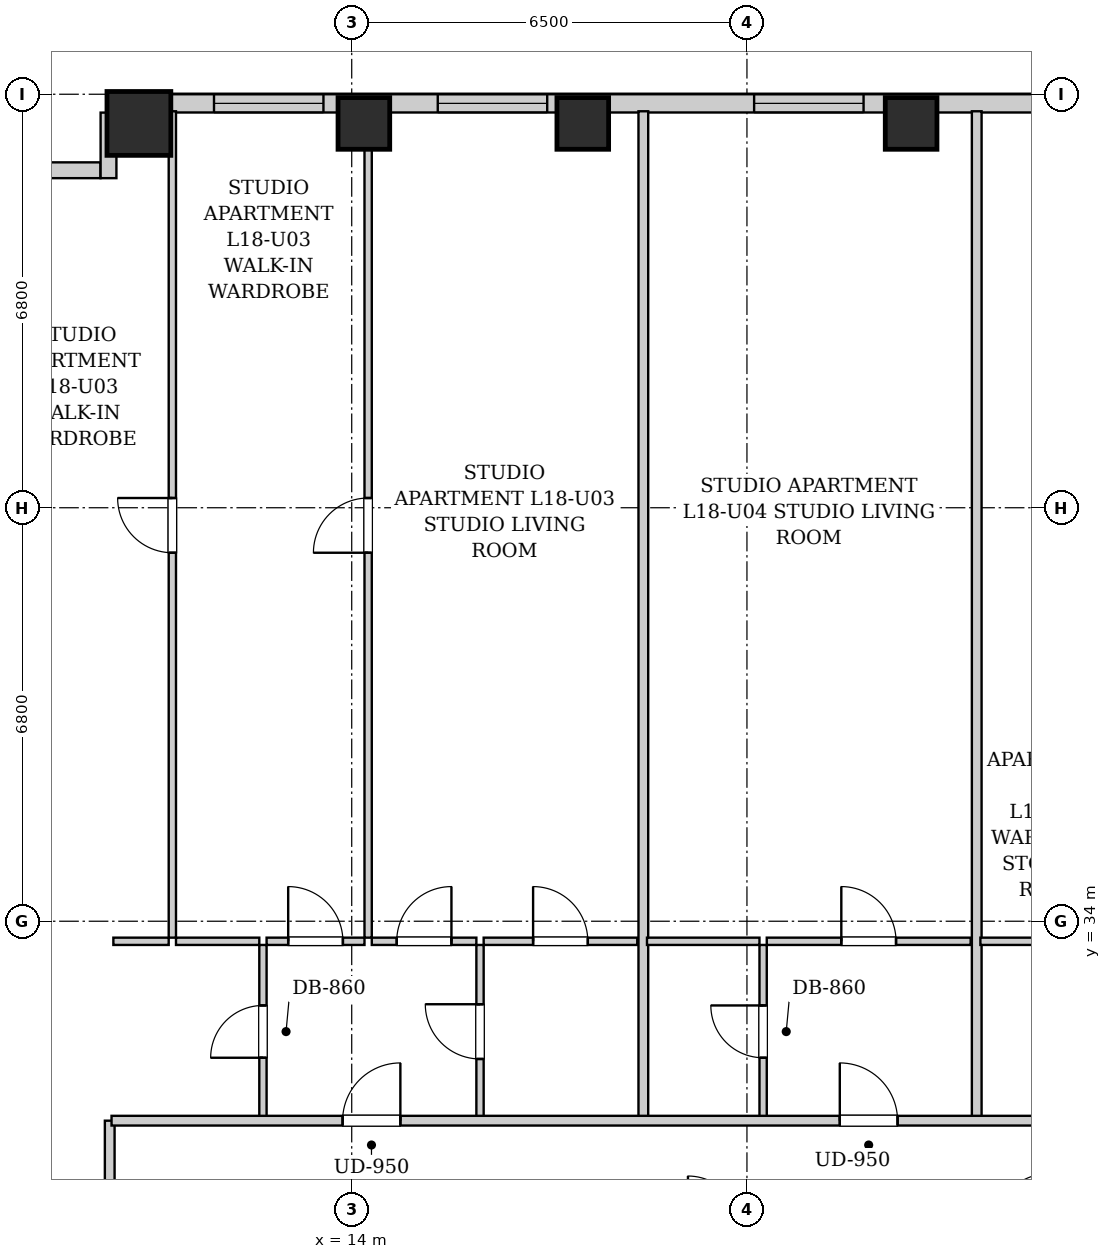
"""IFC4 building model, lengths in metres.
Left out: names, types, materials, properties, quantities, classifications, styles, units other than length and angle.
Written with IfcOpenShell. Run it as: python <this file> out.ifc"""

import sys

from ifc_helpers import new_model, si_unit, direction, frame, frame_2d, origin, origin_2d, place, context, subcontext, project, spatial, rectangle, extrude, element, fill, save


model = new_model("IFC4")
c1 = context("Model", 3, precision=1e-05, world=origin(), true_north=direction((0.0, 1.0)))
c2 = subcontext(c1, "Body", "Model", "MODEL_VIEW")
j1 = project(units=[si_unit("LENGTHUNIT", "METRE"), si_unit("PLANEANGLEUNIT", "RADIAN")], contexts=[c1])
p1 = place(None, origin())
s1 = spatial("IfcSite", under=j1, at=p1, CompositionType="ELEMENT")
p2 = place(p1, origin())
s2 = spatial("IfcBuilding", under=s1, at=p2, CompositionType="ELEMENT")
p3 = place(p2, frame((0.0, 0.0, 67.4)))
s3 = spatial("IfcBuildingStorey", under=s2, at=p3, CompositionType="ELEMENT", Elevation=67.4)
p4 = place(p3, frame((10.5, 47.12, 0.0), z_axis=(0.0, 0.0, 1.0), x_axis=(1.0, 0.0, 0.0)))
e1 = element("IfcColumn", 1, at=p4, inside=s3, PredefinedType="COLUMN", context=c2, shape_type="SweptSolid", body=[
    extrude(rectangle(XDim=1.05, YDim=1.05, at=origin_2d()), origin(), (0.0, 0.0, 1.0), 3.2),
])
for number, where, z_axis, x_axis in (
    (2, (14.2, 47.12, 0.0), (0.0, 0.0, 1.0), (1.0, 0.0, 0.0)),
    (3, (17.8, 47.12, 0.0), (0.0, 0.0, 1.0), (1.0, 0.0, 0.0)),
    (4, (23.2, 47.12, 0.0), (0.0, 0.0, 1.0), (1.0, 0.0, 0.0)),
):
    element("IfcColumn", number, at=place(p3, frame(where, z_axis=z_axis, x_axis=x_axis)), inside=s3, PredefinedType="COLUMN", context=c2, shape_type="SweptSolid", body=[
        extrude(rectangle(XDim=0.85, YDim=0.85, at=origin_2d()), origin(), (0.0, 0.0, 1.0), 3.2),
    ])
p5 = place(p3, frame((10.0, 47.45, 0.0), z_axis=(0.0, 0.0, 1.0), x_axis=(1.0, 0.0, 0.0)))
e5 = element("IfcWall", 5, at=p5, inside=s3, PredefinedType="SOLIDWALL", context=c2, shape_type="SweptSolid", body=[
    extrude(rectangle(XDim=26.35, YDim=0.3, at=frame_2d((13.175, 0.0))), origin(), (0.0, 0.0, 1.0), 1.915),
])
p6 = place(p5, frame((1.735, 0.0, 0.55)))
e6 = element("IfcOpeningElement", 6, at=p6, cuts=e5, PredefinedType="OPENING", context=c2, shape_type="SweptSolid", body=[
    extrude(rectangle(XDim=1.8, YDim=1.2, at=frame_2d((0.9, 0.6))), frame((0.0, 0.16, 0.0), z_axis=(0.0, -1.0, 0.0), x_axis=(1.0, 0.0, 0.0)), (0.0, 0.0, 1.0), 0.32),
])
p7 = place(p5, frame((5.415, 0.0, 0.55)))
e7 = element("IfcOpeningElement", 7, at=p7, cuts=e5, PredefinedType="OPENING", context=c2, shape_type="SweptSolid", body=[
    extrude(rectangle(XDim=1.8, YDim=1.2, at=frame_2d((0.9, 0.6))), frame((0.0, 0.16, 0.0), z_axis=(0.0, -1.0, 0.0), x_axis=(1.0, 0.0, 0.0)), (0.0, 0.0, 1.0), 0.32),
])
p8 = place(p5, frame((10.618, 0.0, 0.55)))
e8 = element("IfcOpeningElement", 8, at=p8, cuts=e5, PredefinedType="OPENING", context=c2, shape_type="SweptSolid", body=[
    extrude(rectangle(XDim=1.8, YDim=1.2, at=frame_2d((0.9, 0.6))), frame((0.0, 0.16, 0.0), z_axis=(0.0, -1.0, 0.0), x_axis=(1.0, 0.0, 0.0)), (0.0, 0.0, 1.0), 0.32),
])
p9 = place(p5, frame((17.696, 0.0, 0.55)))
e9 = element("IfcOpeningElement", 9, at=p9, cuts=e5, PredefinedType="OPENING", context=c2, shape_type="SweptSolid", body=[
    extrude(rectangle(XDim=1.8, YDim=1.2, at=frame_2d((0.9, 0.6))), frame((0.0, 0.16, 0.0), z_axis=(0.0, -1.0, 0.0), x_axis=(1.0, 0.0, 0.0)), (0.0, 0.0, 1.0), 0.32),
])
p10 = place(p5, frame((20.815, 0.0, 0.55)))
e10 = element("IfcOpeningElement", 10, at=p10, cuts=e5, PredefinedType="OPENING", context=c2, shape_type="SweptSolid", body=[
    extrude(rectangle(XDim=1.8, YDim=1.2, at=frame_2d((0.9, 0.6))), frame((0.0, 0.16, 0.0), z_axis=(0.0, -1.0, 0.0), x_axis=(1.0, 0.0, 0.0)), (0.0, 0.0, 1.0), 0.32),
])
p11 = place(p5, frame((23.785, 0.0, 0.55)))
e11 = element("IfcOpeningElement", 11, at=p11, cuts=e5, PredefinedType="OPENING", context=c2, shape_type="SweptSolid", body=[
    extrude(rectangle(XDim=1.35, YDim=1.2, at=frame_2d((0.675, 0.6))), frame((0.0, 0.16, 0.0), z_axis=(0.0, -1.0, 0.0), x_axis=(1.0, 0.0, 0.0)), (0.0, 0.0, 1.0), 0.32),
])
p12 = place(p3, frame((8.882, 46.35, 0.0), z_axis=(0.0, 0.0, 1.0), x_axis=(1.0, 0.0, 0.0)))
e12 = element("IfcWall", 12, at=p12, inside=s3, PredefinedType="SOLIDWALL", context=c2, shape_type="SweptSolid", body=[
    extrude(rectangle(XDim=0.986, YDim=0.26, at=frame_2d((0.493, 0.0))), origin(), (0.0, 0.0, 1.0), 2.88),
])
p13 = place(p3, frame((10.0, 46.22, 0.0), z_axis=(0.0, 0.0, 1.0), x_axis=(0.0, 1.0, 0.0)))
e13 = element("IfcWall", 13, at=p13, inside=s3, PredefinedType="SOLIDWALL", context=c2, shape_type="SweptSolid", body=[
    extrude(rectangle(XDim=1.078, YDim=0.26, at=frame_2d((0.539, 0.0))), origin(), (0.0, 0.0, 1.0), 2.88),
])
p14 = place(p3, frame((10.02, 28.98, 0.0), z_axis=(0.0, 0.0, 1.0), x_axis=(0.0, 1.0, 0.0)))
e14 = element("IfcWall", 14, at=p14, inside=s3, PredefinedType="PARTITIONING", context=c2, shape_type="SweptSolid", body=[
    extrude(rectangle(XDim=1.74, YDim=0.16, at=frame_2d((0.87, 0.0))), origin(), (0.0, 0.0, 1.0), 2.88),
])
p15 = place(p3, frame((12.54, 30.76, 0.0), z_axis=(0.0, 0.0, 1.0), x_axis=(0.0, 1.0, 0.0)))
e15 = element("IfcWall", 15, at=p15, inside=s3, PredefinedType="PARTITIONING", context=c2, shape_type="SweptSolid", body=[
    extrude(rectangle(XDim=2.85, YDim=0.12, at=frame_2d((1.425, 0.0))), origin(), (0.0, 0.0, 1.0), 2.88),
])
p16 = place(p15, frame((0.995, 0.0, 0.0)))
e16 = element("IfcOpeningElement", 16, at=p16, cuts=e15, PredefinedType="OPENING", context=c2, shape_type="SweptSolid", body=[
    extrude(rectangle(XDim=0.86, YDim=2.05, at=frame_2d((0.43, 1.025))), frame((0.0, 0.07, 0.0), z_axis=(0.0, -1.0, 0.0), x_axis=(1.0, 0.0, 0.0)), (0.0, 0.0, 1.0), 0.14),
])
p17 = place(p3, frame((10.08, 33.67, 0.0), z_axis=(0.0, 0.0, 1.0), x_axis=(1.0, 0.0, 0.0)))
e17 = element("IfcWall", 17, at=p17, inside=s3, PredefinedType="PARTITIONING", context=c2, shape_type="SweptSolid", body=[
    extrude(rectangle(XDim=0.91, YDim=0.12, at=frame_2d((0.455, 0.0))), origin(), (0.0, 0.0, 1.0), 2.88),
])
p18 = place(p3, frame((11.11, 33.67, 0.0), z_axis=(0.0, 0.0, 1.0), x_axis=(1.0, 0.0, 0.0)))
e18 = element("IfcWall", 18, at=p18, inside=s3, PredefinedType="PARTITIONING", context=c2, shape_type="SweptSolid", body=[
    extrude(rectangle(XDim=1.37, YDim=0.12, at=frame_2d((0.685, 0.0))), origin(), (0.0, 0.0, 1.0), 2.88),
])
p19 = place(p3, frame((16.11, 30.76, 0.0), z_axis=(0.0, 0.0, 1.0), x_axis=(0.0, 1.0, 0.0)))
e19 = element("IfcWall", 19, at=p19, inside=s3, PredefinedType="PARTITIONING", context=c2, shape_type="SweptSolid", body=[
    extrude(rectangle(XDim=2.85, YDim=0.12, at=frame_2d((1.425, 0.0))), origin(), (0.0, 0.0, 1.0), 2.88),
])
p20 = place(p19, frame((0.975, 0.0, 0.0)))
e20 = element("IfcOpeningElement", 20, at=p20, cuts=e19, PredefinedType="OPENING", context=c2, shape_type="SweptSolid", body=[
    extrude(rectangle(XDim=0.9, YDim=2.05, at=frame_2d((0.45, 1.025))), frame((0.0, 0.07, 0.0), z_axis=(0.0, -1.0, 0.0), x_axis=(1.0, 0.0, 0.0)), (0.0, 0.0, 1.0), 0.14),
])
p21 = place(p3, frame((12.6, 33.67, 0.0), z_axis=(0.0, 0.0, 1.0), x_axis=(1.0, 0.0, 0.0)))
e21 = element("IfcWall", 21, at=p21, inside=s3, PredefinedType="PARTITIONING", context=c2, shape_type="SweptSolid", body=[
    extrude(rectangle(XDim=1.61, YDim=0.12, at=frame_2d((0.805, 0.0))), origin(), (0.0, 0.0, 1.0), 2.88),
])
p22 = place(p21, frame((0.355, 0.0, 0.0)))
e22 = element("IfcOpeningElement", 22, at=p22, cuts=e21, PredefinedType="OPENING", context=c2, shape_type="SweptSolid", body=[
    extrude(rectangle(XDim=0.9, YDim=2.05, at=frame_2d((0.45, 1.025))), frame((0.0, 0.07, 0.0), z_axis=(0.0, -1.0, 0.0), x_axis=(1.0, 0.0, 0.0)), (0.0, 0.0, 1.0), 0.14),
])
p23 = place(p3, frame((14.33, 33.67, 0.0), z_axis=(0.0, 0.0, 1.0), x_axis=(1.0, 0.0, 0.0)))
e23 = element("IfcWall", 23, at=p23, inside=s3, PredefinedType="PARTITIONING", context=c2, shape_type="SweptSolid", body=[
    extrude(rectangle(XDim=1.72, YDim=0.12, at=frame_2d((0.86, 0.0))), origin(), (0.0, 0.0, 1.0), 2.88),
])
p24 = place(p23, frame((0.41, 0.0, 0.0)))
e24 = element("IfcOpeningElement", 24, at=p24, cuts=e23, PredefinedType="OPENING", context=c2, shape_type="SweptSolid", body=[
    extrude(rectangle(XDim=0.9, YDim=2.05, at=frame_2d((0.45, 1.025))), frame((0.0, 0.07, 0.0), z_axis=(0.0, -1.0, 0.0), x_axis=(1.0, 0.0, 0.0)), (0.0, 0.0, 1.0), 0.14),
])
p25 = place(p3, frame((16.17, 33.67, 0.0), z_axis=(0.0, 0.0, 1.0), x_axis=(1.0, 0.0, 0.0)))
e25 = element("IfcWall", 25, at=p25, inside=s3, PredefinedType="PARTITIONING", context=c2, shape_type="SweptSolid", body=[
    extrude(rectangle(XDim=2.526, YDim=0.12, at=frame_2d((1.263, 0.0))), origin(), (0.0, 0.0, 1.0), 2.88),
])
p26 = place(p25, frame((0.813, 0.0, 0.0)))
e26 = element("IfcOpeningElement", 26, at=p26, cuts=e25, PredefinedType="OPENING", context=c2, shape_type="SweptSolid", body=[
    extrude(rectangle(XDim=0.9, YDim=2.05, at=frame_2d((0.45, 1.025))), frame((0.0, 0.07, 0.0), z_axis=(0.0, -1.0, 0.0), x_axis=(1.0, 0.0, 0.0)), (0.0, 0.0, 1.0), 0.14),
])
p27 = place(p3, frame((11.05, 33.73, 0.0), z_axis=(0.0, 0.0, 1.0), x_axis=(0.0, 1.0, 0.0)))
e27 = element("IfcWall", 27, at=p27, inside=s3, PredefinedType="PARTITIONING", context=c2, shape_type="SweptSolid", body=[
    extrude(rectangle(XDim=13.59, YDim=0.12, at=frame_2d((6.795, 0.0))), origin(), (0.0, 0.0, 1.0), 2.88),
])
p28 = place(p27, frame((6.33, 0.0, 0.0)))
e28 = element("IfcOpeningElement", 28, at=p28, cuts=e27, PredefinedType="OPENING", context=c2, shape_type="SweptSolid", body=[
    extrude(rectangle(XDim=0.9, YDim=2.05, at=frame_2d((0.45, 1.025))), frame((0.0, 0.07, 0.0), z_axis=(0.0, -1.0, 0.0), x_axis=(1.0, 0.0, 0.0)), (0.0, 0.0, 1.0), 0.14),
])
p29 = place(p3, frame((14.27, 33.73, 0.0), z_axis=(0.0, 0.0, 1.0), x_axis=(0.0, 1.0, 0.0)))
e29 = element("IfcWall", 29, at=p29, inside=s3, PredefinedType="PARTITIONING", context=c2, shape_type="SweptSolid", body=[
    extrude(rectangle(XDim=13.59, YDim=0.12, at=frame_2d((6.795, 0.0))), origin(), (0.0, 0.0, 1.0), 2.88),
])
p30 = place(p29, frame((6.33, 0.0, 0.0)))
e30 = element("IfcOpeningElement", 30, at=p30, cuts=e29, PredefinedType="OPENING", context=c2, shape_type="SweptSolid", body=[
    extrude(rectangle(XDim=0.9, YDim=2.05, at=frame_2d((0.45, 1.025))), frame((0.0, 0.07, 0.0), z_axis=(0.0, -1.0, 0.0), x_axis=(1.0, 0.0, 0.0)), (0.0, 0.0, 1.0), 0.14),
])
p31 = place(p3, frame((18.796, 30.76, 0.0), z_axis=(0.0, 0.0, 1.0), x_axis=(0.0, 1.0, 0.0)))
e31 = element("IfcWall", 31, at=p31, inside=s3, PredefinedType="PARTITIONING", context=c2, shape_type="SweptSolid", body=[
    extrude(rectangle(XDim=16.56, YDim=0.16, at=frame_2d((8.28, 0.0))), origin(), (0.0, 0.0, 1.0), 2.88),
])
p32 = place(p3, frame((20.766, 30.76, 0.0), z_axis=(0.0, 0.0, 1.0), x_axis=(0.0, 1.0, 0.0)))
e32 = element("IfcWall", 32, at=p32, inside=s3, PredefinedType="PARTITIONING", context=c2, shape_type="SweptSolid", body=[
    extrude(rectangle(XDim=2.85, YDim=0.12, at=frame_2d((1.425, 0.0))), origin(), (0.0, 0.0, 1.0), 2.88),
])
p33 = place(p32, frame((0.995, 0.0, 0.0)))
e33 = element("IfcOpeningElement", 33, at=p33, cuts=e32, PredefinedType="OPENING", context=c2, shape_type="SweptSolid", body=[
    extrude(rectangle(XDim=0.86, YDim=2.05, at=frame_2d((0.43, 1.025))), frame((0.0, 0.07, 0.0), z_axis=(0.0, -1.0, 0.0), x_axis=(1.0, 0.0, 0.0)), (0.0, 0.0, 1.0), 0.14),
])
p34 = place(p3, frame((18.856, 33.67, 0.0), z_axis=(0.0, 0.0, 1.0), x_axis=(1.0, 0.0, 0.0)))
e34 = element("IfcWall", 34, at=p34, inside=s3, PredefinedType="PARTITIONING", context=c2, shape_type="SweptSolid", body=[
    extrude(rectangle(XDim=1.85, YDim=0.12, at=frame_2d((0.925, 0.0))), origin(), (0.0, 0.0, 1.0), 2.88),
])
p35 = place(p3, frame((20.826, 33.67, 0.0), z_axis=(0.0, 0.0, 1.0), x_axis=(1.0, 0.0, 0.0)))
e35 = element("IfcWall", 35, at=p35, inside=s3, PredefinedType="PARTITIONING", context=c2, shape_type="SweptSolid", body=[
    extrude(rectangle(XDim=3.353, YDim=0.12, at=frame_2d((1.677, 0.0))), origin(), (0.0, 0.0, 1.0), 2.88),
])
p36 = place(p35, frame((1.226, 0.0, 0.0)))
e36 = element("IfcOpeningElement", 36, at=p36, cuts=e35, PredefinedType="OPENING", context=c2, shape_type="SweptSolid", body=[
    extrude(rectangle(XDim=0.9, YDim=2.05, at=frame_2d((0.45, 1.025))), frame((0.0, 0.07, 0.0), z_axis=(0.0, -1.0, 0.0), x_axis=(1.0, 0.0, 0.0)), (0.0, 0.0, 1.0), 0.14),
])
p37 = place(p3, frame((24.279, 30.76, 0.0), z_axis=(0.0, 0.0, 1.0), x_axis=(0.0, 1.0, 0.0)))
e37 = element("IfcWall", 37, at=p37, inside=s3, PredefinedType="PARTITIONING", context=c2, shape_type="SweptSolid", body=[
    extrude(rectangle(XDim=16.56, YDim=0.16, at=frame_2d((8.28, 0.0))), origin(), (0.0, 0.0, 1.0), 2.88),
])
p38 = place(p3, frame((24.339, 33.67, 0.0), z_axis=(0.0, 0.0, 1.0), x_axis=(1.0, 0.0, 0.0)))
e38 = element("IfcWall", 38, at=p38, inside=s3, PredefinedType="PARTITIONING", context=c2, shape_type="SweptSolid", body=[
    extrude(rectangle(XDim=2.3, YDim=0.12, at=frame_2d((1.15, 0.0))), origin(), (0.0, 0.0, 1.0), 2.88),
])
p39 = place(p3, frame((10.05, 30.72, 0.0), z_axis=(0.0, 0.0, 1.0), x_axis=(1.0, 0.0, 0.0)))
e39 = element("IfcWall", 39, at=p39, inside=s3, PredefinedType="PARTITIONING", context=c2, shape_type="SweptSolid", body=[
    extrude(rectangle(XDim=33.9, YDim=0.16, at=frame_2d((16.95, 0.0))), origin(), (0.0, 0.0, 1.0), 2.88),
])
p40 = place(p39, frame((3.8, 0.0, 0.0)))
e40 = element("IfcOpeningElement", 40, at=p40, cuts=e39, PredefinedType="OPENING", context=c2, shape_type="SweptSolid", body=[
    extrude(rectangle(XDim=0.95, YDim=2.1, at=frame_2d((0.475, 1.05))), frame((0.0, 0.09, 0.0), z_axis=(0.0, -1.0, 0.0), x_axis=(1.0, 0.0, 0.0)), (0.0, 0.0, 1.0), 0.18),
])
p41 = place(p39, frame((11.977, 0.0, 0.0)))
e41 = element("IfcOpeningElement", 41, at=p41, cuts=e39, PredefinedType="OPENING", context=c2, shape_type="SweptSolid", body=[
    extrude(rectangle(XDim=0.95, YDim=2.1, at=frame_2d((0.475, 1.05))), frame((0.0, 0.09, 0.0), z_axis=(0.0, -1.0, 0.0), x_axis=(1.0, 0.0, 0.0)), (0.0, 0.0, 1.0), 0.18),
])
p42 = place(p39, frame((18.09, 0.0, 0.0)))
e42 = element("IfcOpeningElement", 42, at=p42, cuts=e39, PredefinedType="OPENING", context=c2, shape_type="SweptSolid", body=[
    extrude(rectangle(XDim=0.95, YDim=2.1, at=frame_2d((0.475, 1.05))), frame((0.0, 0.09, 0.0), z_axis=(0.0, -1.0, 0.0), x_axis=(1.0, 0.0, 0.0)), (0.0, 0.0, 1.0), 0.18),
])
p43 = place(p39, frame((31.525, 0.0, 0.0)))
e43 = element("IfcOpeningElement", 43, at=p43, cuts=e39, PredefinedType="OPENING", context=c2, shape_type="SweptSolid", body=[
    extrude(rectangle(XDim=0.95, YDim=2.1, at=frame_2d((0.475, 1.05))), frame((0.0, 0.09, 0.0), z_axis=(0.0, -1.0, 0.0), x_axis=(1.0, 0.0, 0.0)), (0.0, 0.0, 1.0), 0.18),
])
p44 = place(p16, origin())
e44 = element("IfcDoor", 44, at=p44, inside=s3, OperationType="SINGLE_SWING_LEFT", PredefinedType="DOOR", context=c2, shape_type="SweptSolid", body=[
    extrude(rectangle(XDim=0.86, YDim=2.05, at=frame_2d((0.43, 1.025))), frame((0.0, 0.025, 0.0), z_axis=(0.0, -1.0, 0.0), x_axis=(1.0, 0.0, 0.0)), (0.0, 0.0, 1.0), 0.05),
])
fill(e16, e44)
p45 = place(p20, origin())
e45 = element("IfcDoor", 45, at=p45, inside=s3, OperationType="SINGLE_SWING_RIGHT", PredefinedType="DOOR", context=c2, shape_type="SweptSolid", body=[
    extrude(rectangle(XDim=0.9, YDim=2.05, at=frame_2d((0.45, 1.025))), frame((0.0, 0.025, 0.0), z_axis=(0.0, -1.0, 0.0), x_axis=(1.0, 0.0, 0.0)), (0.0, 0.0, 1.0), 0.05),
])
fill(e20, e45)
p46 = place(p22, origin())
e46 = element("IfcDoor", 46, at=p46, inside=s3, OperationType="SINGLE_SWING_LEFT", PredefinedType="DOOR", context=c2, shape_type="SweptSolid", body=[
    extrude(rectangle(XDim=0.9, YDim=2.05, at=frame_2d((0.45, 1.025))), frame((0.0, 0.025, 0.0), z_axis=(0.0, -1.0, 0.0), x_axis=(1.0, 0.0, 0.0)), (0.0, 0.0, 1.0), 0.05),
])
fill(e22, e46)
p47 = place(p24, origin())
e47 = element("IfcDoor", 47, at=p47, inside=s3, OperationType="SINGLE_SWING_RIGHT", PredefinedType="DOOR", context=c2, shape_type="SweptSolid", body=[
    extrude(rectangle(XDim=0.9, YDim=2.05, at=frame_2d((0.45, 1.025))), frame((0.0, 0.025, 0.0), z_axis=(0.0, -1.0, 0.0), x_axis=(1.0, 0.0, 0.0)), (0.0, 0.0, 1.0), 0.05),
])
fill(e24, e47)
p48 = place(p26, origin())
e48 = element("IfcDoor", 48, at=p48, inside=s3, OperationType="SINGLE_SWING_LEFT", PredefinedType="DOOR", context=c2, shape_type="SweptSolid", body=[
    extrude(rectangle(XDim=0.9, YDim=2.05, at=frame_2d((0.45, 1.025))), frame((0.0, 0.025, 0.0), z_axis=(0.0, -1.0, 0.0), x_axis=(1.0, 0.0, 0.0)), (0.0, 0.0, 1.0), 0.05),
])
fill(e26, e48)
p49 = place(p28, origin())
e49 = element("IfcDoor", 49, at=p49, inside=s3, OperationType="SINGLE_SWING_RIGHT", PredefinedType="DOOR", context=c2, shape_type="SweptSolid", body=[
    extrude(rectangle(XDim=0.9, YDim=2.05, at=frame_2d((0.45, 1.025))), frame((0.0, 0.025, 0.0), z_axis=(0.0, -1.0, 0.0), x_axis=(1.0, 0.0, 0.0)), (0.0, 0.0, 1.0), 0.05),
])
fill(e28, e49)
p50 = place(p30, origin())
e50 = element("IfcDoor", 50, at=p50, inside=s3, OperationType="SINGLE_SWING_LEFT", PredefinedType="DOOR", context=c2, shape_type="SweptSolid", body=[
    extrude(rectangle(XDim=0.9, YDim=2.05, at=frame_2d((0.45, 1.025))), frame((0.0, 0.025, 0.0), z_axis=(0.0, -1.0, 0.0), x_axis=(1.0, 0.0, 0.0)), (0.0, 0.0, 1.0), 0.05),
])
fill(e30, e50)
p51 = place(p33, origin())
e51 = element("IfcDoor", 51, at=p51, inside=s3, OperationType="SINGLE_SWING_RIGHT", PredefinedType="DOOR", context=c2, shape_type="SweptSolid", body=[
    extrude(rectangle(XDim=0.86, YDim=2.05, at=frame_2d((0.43, 1.025))), frame((0.0, 0.025, 0.0), z_axis=(0.0, -1.0, 0.0), x_axis=(1.0, 0.0, 0.0)), (0.0, 0.0, 1.0), 0.05),
])
fill(e33, e51)
p52 = place(p36, origin())
e52 = element("IfcDoor", 52, at=p52, inside=s3, OperationType="SINGLE_SWING_LEFT", PredefinedType="DOOR", context=c2, shape_type="SweptSolid", body=[
    extrude(rectangle(XDim=0.9, YDim=2.05, at=frame_2d((0.45, 1.025))), frame((0.0, 0.025, 0.0), z_axis=(0.0, -1.0, 0.0), x_axis=(1.0, 0.0, 0.0)), (0.0, 0.0, 1.0), 0.05),
])
fill(e36, e52)
p53 = place(p40, origin())
e53 = element("IfcDoor", 53, at=p53, inside=s3, OperationType="SINGLE_SWING_RIGHT", PredefinedType="DOOR", context=c2, shape_type="SweptSolid", body=[
    extrude(rectangle(XDim=0.95, YDim=2.1, at=frame_2d((0.475, 1.05))), frame((0.0, 0.025, 0.0), z_axis=(0.0, -1.0, 0.0), x_axis=(1.0, 0.0, 0.0)), (0.0, 0.0, 1.0), 0.05),
])
fill(e40, e53)
p54 = place(p41, origin())
e54 = element("IfcDoor", 54, at=p54, inside=s3, OperationType="SINGLE_SWING_LEFT", PredefinedType="DOOR", context=c2, shape_type="SweptSolid", body=[
    extrude(rectangle(XDim=0.95, YDim=2.1, at=frame_2d((0.475, 1.05))), frame((0.0, 0.025, 0.0), z_axis=(0.0, -1.0, 0.0), x_axis=(1.0, 0.0, 0.0)), (0.0, 0.0, 1.0), 0.05),
])
fill(e41, e54)
p55 = place(p6, origin())
e55 = element("IfcWindow", 55, at=p55, inside=s3, PartitioningType="DOUBLE_PANEL_VERTICAL", PredefinedType="WINDOW", context=c2, shape_type="SweptSolid", body=[
    extrude(rectangle(XDim=1.8, YDim=1.2, at=frame_2d((0.9, 0.6))), frame((0.0, 0.03, 0.0), z_axis=(0.0, -1.0, 0.0), x_axis=(1.0, 0.0, 0.0)), (0.0, 0.0, 1.0), 0.06),
])
fill(e6, e55)
p56 = place(p7, origin())
e56 = element("IfcWindow", 56, at=p56, inside=s3, PartitioningType="DOUBLE_PANEL_VERTICAL", PredefinedType="WINDOW", context=c2, shape_type="SweptSolid", body=[
    extrude(rectangle(XDim=1.8, YDim=1.2, at=frame_2d((0.9, 0.6))), frame((0.0, 0.03, 0.0), z_axis=(0.0, -1.0, 0.0), x_axis=(1.0, 0.0, 0.0)), (0.0, 0.0, 1.0), 0.06),
])
fill(e7, e56)
p57 = place(p8, origin())
e57 = element("IfcWindow", 57, at=p57, inside=s3, PartitioningType="DOUBLE_PANEL_VERTICAL", PredefinedType="WINDOW", context=c2, shape_type="SweptSolid", body=[
    extrude(rectangle(XDim=1.8, YDim=1.2, at=frame_2d((0.9, 0.6))), frame((0.0, 0.03, 0.0), z_axis=(0.0, -1.0, 0.0), x_axis=(1.0, 0.0, 0.0)), (0.0, 0.0, 1.0), 0.06),
])
fill(e8, e57)
save(model, sys.argv[1])
